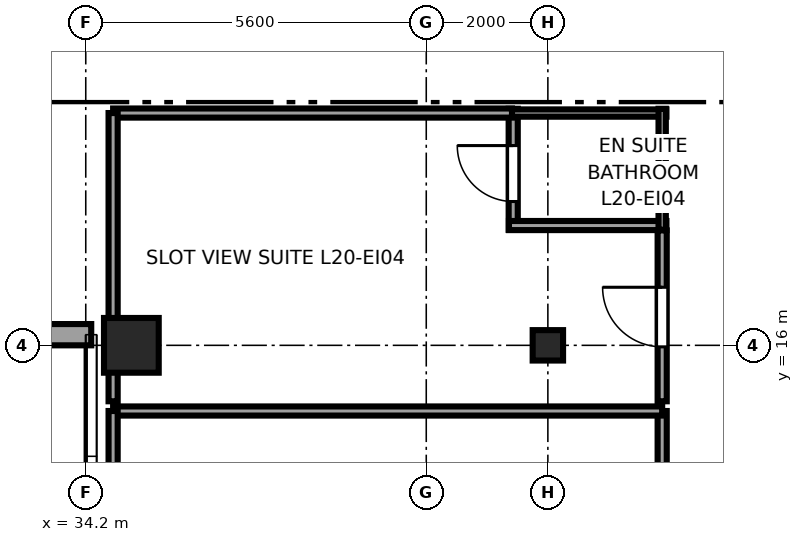
"""IFC4 building model, lengths in metres.
Left out: names, types, materials, properties, quantities, classifications, styles, units other than length and angle.
Written with IfcOpenShell. Run it as: python <this file> out.ifc"""

import sys

from ifc_helpers import new_model, si_unit, direction, frame, frame_2d, origin, origin_2d, place, context, subcontext, project, spatial, rectangle, i_section, extrude, source, transform, mapped, element, fill, save


model = new_model("IFC4")
c1 = context("Model", 3, precision=1e-05, world=origin(), true_north=direction((0.0, 1.0)))
c2 = subcontext(c1, "Body", "Model", "MODEL_VIEW")
j1 = project(units=[si_unit("LENGTHUNIT", "METRE"), si_unit("PLANEANGLEUNIT", "RADIAN")], contexts=[c1])
p1 = place(None, origin())
s1 = spatial("IfcSite", under=j1, at=p1, CompositionType="ELEMENT")
p2 = place(p1, origin())
s2 = spatial("IfcBuilding", under=s1, at=p2, CompositionType="ELEMENT")
p3 = place(p2, frame((0.0, 0.0, 81.7)))
s3 = spatial("IfcBuildingStorey", under=s2, at=p3, CompositionType="ELEMENT", Elevation=81.7)
m1 = source(origin(), c2, "Body", "SweptSolid", [
    extrude(rectangle(XDim=0.9, YDim=0.9, at=origin_2d()), origin(), (0.0, 0.0, 1.0), 3.55),
])
p4 = place(p3, frame((34.95, 16.0, 0.0), z_axis=(0.0, 0.0, 1.0), x_axis=(1.0, 0.0, 0.0)))
e1 = element("IfcColumn", 1, at=p4, inside=s3, PredefinedType="COLUMN", context=c2, shape_type="MappedRepresentation", body=[
    mapped(m1, transform((0.0, 0.0, 0.0), x_axis=(1.0, 0.0, 0.0), y_axis=(0.0, 1.0, 0.0), z_axis=(0.0, 0.0, 1.0), scale=1.0)),
])
m2 = source(origin(), c2, "Body", "SweptSolid", [
    extrude(i_section(OverallWidth=0.5, OverallDepth=0.5, WebThickness=0.022, FlangeThickness=0.034, at=origin_2d()), origin(), (0.0, 0.0, 1.0), 3.55),
])
p5 = place(p3, frame((41.8, 16.0, 0.0), z_axis=(0.0, 0.0, 1.0), x_axis=(1.0, 0.0, 0.0)))
e2 = element("IfcColumn", 2, at=p5, inside=s3, PredefinedType="COLUMN", context=c2, shape_type="MappedRepresentation", body=[
    mapped(m2, transform((0.0, 0.0, 0.0), x_axis=(1.0, 0.0, 0.0), y_axis=(0.0, 1.0, 0.0), z_axis=(0.0, 0.0, 1.0), scale=1.0)),
])
p6 = place(p3, frame((22.71, 16.175, 0.0), z_axis=(0.0, 0.0, 1.0), x_axis=(1.0, 0.0, 0.0)))
e3 = element("IfcWall", 3, at=p6, inside=s3, PredefinedType="SOLIDWALL", context=c2, shape_type="SweptSolid", body=[
    extrude(rectangle(XDim=11.58, YDim=0.35, at=frame_2d((5.79, 0.0))), origin(), (0.0, 0.0, 1.0), 2.748),
])
p7 = place(p6, frame((2.295, 0.0, 0.68)))
e4 = element("IfcOpeningElement", 4, at=p7, cuts=e3, PredefinedType="OPENING", context=c2, shape_type="SweptSolid", body=[
    extrude(rectangle(XDim=1.8, YDim=1.85, at=frame_2d((0.9, 0.925))), frame((0.0, 0.185, 0.0), z_axis=(0.0, -1.0, 0.0), x_axis=(1.0, 0.0, 0.0)), (0.0, 0.0, 1.0), 0.37),
])
p8 = place(p6, frame((7.485, 0.0, 0.68)))
e5 = element("IfcOpeningElement", 5, at=p8, cuts=e3, PredefinedType="OPENING", context=c2, shape_type="SweptSolid", body=[
    extrude(rectangle(XDim=1.8, YDim=1.85, at=frame_2d((0.9, 0.925))), frame((0.0, 0.185, 0.0), z_axis=(0.0, -1.0, 0.0), x_axis=(1.0, 0.0, 0.0)), (0.0, 0.0, 1.0), 0.37),
])
p9 = place(p3, frame((41.23, 17.9, 0.0), z_axis=(0.0, 0.0, 1.0), x_axis=(0.0, 1.0, 0.0)))
e6 = element("IfcWall", 6, at=p9, inside=s3, PredefinedType="PARTITIONING", context=c2, shape_type="SweptSolid", body=[
    extrude(rectangle(XDim=1.99, YDim=0.15, at=frame_2d((0.995, 0.0))), origin(), (0.0, 0.0, 1.0), 3.37),
])
p10 = place(p9, frame((0.465, 0.0, 0.0)))
e7 = element("IfcOpeningElement", 7, at=p10, cuts=e6, PredefinedType="OPENING", context=c2, shape_type="SweptSolid", body=[
    extrude(rectangle(XDim=0.92, YDim=2.01, at=frame_2d((0.46, 1.005))), frame((0.0, 0.085, 0.0), z_axis=(0.0, -1.0, 0.0), x_axis=(1.0, 0.0, 0.0)), (0.0, 0.0, 1.0), 0.17),
])
p11 = place(p3, frame((41.16, 17.97, 0.0), z_axis=(0.0, 0.0, 1.0), x_axis=(1.0, 0.0, 0.0)))
e8 = element("IfcWall", 8, at=p11, inside=s3, PredefinedType="PARTITIONING", context=c2, shape_type="SweptSolid", body=[
    extrude(rectangle(XDim=2.59, YDim=0.15, at=frame_2d((1.295, 0.0))), origin(), (0.0, 0.0, 1.0), 3.37),
])
p12 = place(p3, frame((41.16, 19.82, 0.0), z_axis=(0.0, 0.0, 1.0), x_axis=(1.0, 0.0, 0.0)))
e9 = element("IfcWall", 9, at=p12, inside=s3, PredefinedType="PLUMBINGWALL", context=c2, shape_type="SweptSolid", body=[
    extrude(rectangle(XDim=2.59, YDim=0.12, at=frame_2d((1.295, 0.0))), origin(), (0.0, 0.0, 1.0), 3.37),
])
p13 = place(p3, frame((43.68, 17.9, 0.0), z_axis=(0.0, 0.0, 1.0), x_axis=(0.0, 1.0, 0.0)))
e10 = element("IfcWall", 10, at=p13, inside=s3, PredefinedType="PLUMBINGWALL", context=c2, shape_type="SweptSolid", body=[
    extrude(rectangle(XDim=1.99, YDim=0.12, at=frame_2d((0.995, 0.0))), origin(), (0.0, 0.0, 1.0), 3.37),
])
p14 = place(p3, frame((43.68, 12.21, 0.0), z_axis=(0.0, 0.0, 1.0), x_axis=(0.0, 1.0, 0.0)))
e11 = element("IfcWall", 11, at=p14, inside=s3, PredefinedType="PARTITIONING", context=c2, shape_type="SweptSolid", body=[
    extrude(rectangle(XDim=2.71, YDim=0.15, at=frame_2d((1.355, 0.0))), origin(), (0.0, 0.0, 1.0), 3.37),
])
p15 = place(p14, frame((0.845, 0.0, 0.0)))
e12 = element("IfcOpeningElement", 12, at=p15, cuts=e11, PredefinedType="OPENING", context=c2, shape_type="SweptSolid", body=[
    extrude(rectangle(XDim=0.98, YDim=2.12, at=frame_2d((0.49, 1.06))), frame((0.0, 0.085, 0.0), z_axis=(0.0, -1.0, 0.0), x_axis=(1.0, 0.0, 0.0)), (0.0, 0.0, 1.0), 0.17),
])
p16 = place(p3, frame((34.65, 14.92, 0.0), z_axis=(0.0, 0.0, 1.0), x_axis=(1.0, 0.0, 0.0)))
e13 = element("IfcWall", 13, at=p16, inside=s3, PredefinedType="PARTITIONING", context=c2, shape_type="SweptSolid", body=[
    extrude(rectangle(XDim=9.03, YDim=0.15, at=frame_2d((4.515, 0.0))), origin(), (0.0, 0.0, 1.0), 3.37),
])
p17 = place(p3, frame((34.65, 10.28, 0.0), z_axis=(0.0, 0.0, 1.0), x_axis=(0.0, 1.0, 0.0)))
e14 = element("IfcWall", 14, at=p17, inside=s3, PredefinedType="PARTITIONING", context=c2, shape_type="SweptSolid", body=[
    extrude(rectangle(XDim=4.64, YDim=0.15, at=frame_2d((2.32, 0.0))), origin(), (0.0, 0.0, 1.0), 3.37),
])
p18 = place(p3, frame((43.68, 15.08, 0.0), z_axis=(0.0, 0.0, 1.0), x_axis=(0.0, 1.0, 0.0)))
e15 = element("IfcWall", 15, at=p18, inside=s3, PredefinedType="PARTITIONING", context=c2, shape_type="SweptSolid", body=[
    extrude(rectangle(XDim=2.81, YDim=0.15, at=frame_2d((1.405, 0.0))), origin(), (0.0, 0.0, 1.0), 3.37),
])
p19 = place(p18, frame((0.895, 0.0, 0.0)))
e16 = element("IfcOpeningElement", 16, at=p19, cuts=e15, PredefinedType="OPENING", context=c2, shape_type="SweptSolid", body=[
    extrude(rectangle(XDim=0.98, YDim=2.12, at=frame_2d((0.49, 1.06))), frame((0.0, 0.085, 0.0), z_axis=(0.0, -1.0, 0.0), x_axis=(1.0, 0.0, 0.0)), (0.0, 0.0, 1.0), 0.17),
])
p20 = place(p3, frame((34.65, 19.82, 0.0), z_axis=(0.0, 0.0, 1.0), x_axis=(1.0, 0.0, 0.0)))
e17 = element("IfcWall", 17, at=p20, inside=s3, PredefinedType="PARTITIONING", context=c2, shape_type="SweptSolid", body=[
    extrude(rectangle(XDim=6.56, YDim=0.15, at=frame_2d((3.28, 0.0))), origin(), (0.0, 0.0, 1.0), 3.37),
])
p21 = place(p3, frame((34.65, 15.08, 0.0), z_axis=(0.0, 0.0, 1.0), x_axis=(0.0, 1.0, 0.0)))
e18 = element("IfcWall", 18, at=p21, inside=s3, PredefinedType="PARTITIONING", context=c2, shape_type="SweptSolid", body=[
    extrude(rectangle(XDim=4.74, YDim=0.15, at=frame_2d((2.37, 0.0))), origin(), (0.0, 0.0, 1.0), 3.37),
])
m3 = source(origin(), c2, "Body", "SweptSolid", [
    extrude(rectangle(XDim=0.92, YDim=2.01, at=frame_2d((0.46, 1.005))), frame((0.0, 0.025, 0.0), z_axis=(0.0, -1.0, 0.0), x_axis=(1.0, 0.0, 0.0)), (0.0, 0.0, 1.0), 0.05),
])
p22 = place(p10, origin())
e19 = element("IfcDoor", 19, at=p22, inside=s3, OperationType="SINGLE_SWING_RIGHT", PredefinedType="DOOR", context=c2, shape_type="MappedRepresentation", body=[
    mapped(m3, transform((0.0, 0.0, 0.0), x_axis=(1.0, 0.0, 0.0), y_axis=(0.0, 1.0, 0.0), z_axis=(0.0, 0.0, 1.0), scale=1.0)),
])
fill(e7, e19)
m4 = source(origin(), c2, "Body", "SweptSolid", [
    extrude(rectangle(XDim=0.98, YDim=2.12, at=frame_2d((0.49, 1.06))), frame((0.0, 0.025, 0.0), z_axis=(0.0, -1.0, 0.0), x_axis=(1.0, 0.0, 0.0)), (0.0, 0.0, 1.0), 0.05),
])
p23 = place(p19, origin())
e20 = element("IfcDoor", 20, at=p23, inside=s3, OperationType="SINGLE_SWING_RIGHT", PredefinedType="DOOR", context=c2, shape_type="MappedRepresentation", body=[
    mapped(m4, transform((0.0, 0.0, 0.0), x_axis=(1.0, 0.0, 0.0), y_axis=(0.0, 1.0, 0.0), z_axis=(0.0, 0.0, 1.0), scale=1.0)),
])
fill(e16, e20)
save(model, sys.argv[1])
